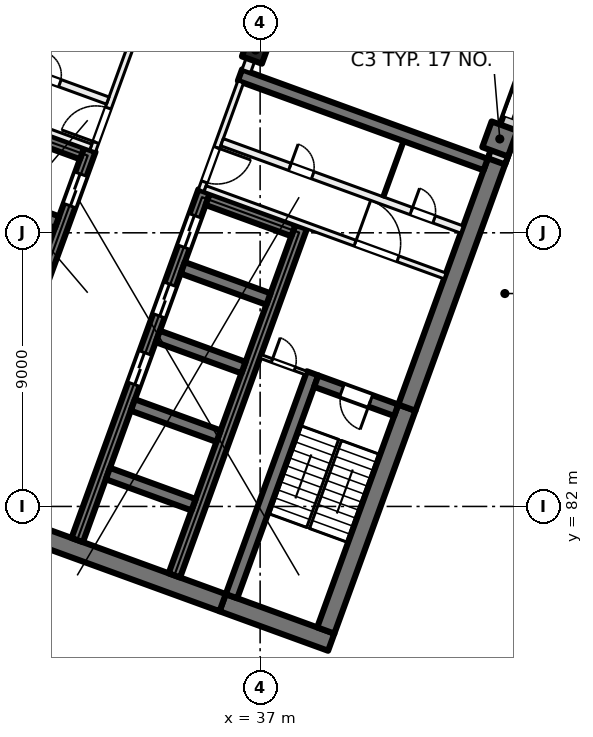
"""IFC4 building model, lengths in metres.
Left out: names, types, materials, properties, quantities, classifications, styles, units other than length and angle.
Written with IfcOpenShell. Run it as: python <this file> out.ifc"""

import sys

from ifc_helpers import new_model, si_unit, direction, frame, frame_2d, origin, origin_2d, place, context, subcontext, project, spatial, rectangle, extrude, element, fill, save


model = new_model("IFC4")
c1 = context("Model", 3, precision=1e-05, world=origin(), true_north=direction((0.0, 1.0)))
c2 = subcontext(c1, "Body", "Model", "MODEL_VIEW")
j1 = project(units=[si_unit("LENGTHUNIT", "METRE"), si_unit("PLANEANGLEUNIT", "RADIAN")], contexts=[c1])
p1 = place(None, origin())
s1 = spatial("IfcSite", under=j1, at=p1, CompositionType="ELEMENT")
p2 = place(p1, origin())
s2 = spatial("IfcBuilding", under=s1, at=p2, CompositionType="ELEMENT")
p3 = place(p2, frame((0.0, 0.0, 71.5)))
s3 = spatial("IfcBuildingStorey", under=s2, at=p3, CompositionType="ELEMENT", Elevation=71.5)
p4 = place(p3, frame((36.849, 97.011, 0.0), z_axis=(0.0, 0.0, 1.0), x_axis=(-0.342020143326, -0.939692620786, 0.0)))
e1 = element("IfcColumn", 1, at=p4, inside=s3, PredefinedType="COLUMN", context=c2, shape_type="SweptSolid", body=[
    extrude(rectangle(XDim=0.7, YDim=0.7, at=origin_2d()), origin(), (0.0, 0.0, 1.0), 4.0),
])
p5 = place(p3, frame((44.884, 94.087, 0.0), z_axis=(0.0, 0.0, 1.0), x_axis=(-0.342020143326, -0.939692620786, 0.0)))
e2 = element("IfcColumn", 2, at=p5, inside=s3, PredefinedType="COLUMN", context=c2, shape_type="SweptSolid", body=[
    extrude(rectangle(XDim=0.9, YDim=0.9, at=origin_2d()), origin(), (0.0, 0.0, 1.0), 4.0),
])
p6 = place(p3, frame((39.338, 77.535, 0.0), z_axis=(0.0, 0.0, 1.0), x_axis=(-0.939701471648, 0.341995824804, 0.0)))
e3 = element("IfcWall", 3, at=p6, inside=s3, PredefinedType="SHEAR", context=c2, shape_type="SweptSolid", body=[
    extrude(rectangle(XDim=3.8, YDim=0.6, at=frame_2d((1.9, 0.0))), origin(), (0.0, 0.0, 1.0), 4.0),
])
p7 = place(p3, frame((35.767, 78.835, 0.0), z_axis=(0.0, 0.0, 1.0), x_axis=(-0.939692894512, 0.342019391267, 0.0)))
e4 = element("IfcWall", 4, at=p7, inside=s3, PredefinedType="SHEAR", context=c2, shape_type="SweptSolid", body=[
    extrude(rectangle(XDim=14.4, YDim=0.6, at=frame_2d((7.2, 0.0))), origin(), (0.0, 0.0, 1.0), 4.0),
])
p8 = place(p3, frame((39.159, 77.92, 0.0), z_axis=(0.0, 0.0, 1.0), x_axis=(0.342016982193, 0.939693771338, 0.0)))
e5 = element("IfcWall", 5, at=p8, inside=s3, PredefinedType="SHEAR", context=c2, shape_type="SweptSolid", body=[
    extrude(rectangle(XDim=7.8, YDim=0.6, at=frame_2d((3.9, 0.0))), origin(), (0.0, 0.0, 1.0), 4.0),
])
p9 = place(p3, frame((41.827, 85.249, 0.0), z_axis=(0.0, 0.0, 1.0), x_axis=(0.342016162452, 0.939694069696, 0.0)))
e6 = element("IfcWall", 6, at=p9, inside=s3, PredefinedType="SHEAR", context=c2, shape_type="SweptSolid", body=[
    extrude(rectangle(XDim=8.9, YDim=0.6, at=frame_2d((4.45, 0.0))), origin(), (0.0, 0.0, 1.0), 4.0),
])
p10 = place(p3, frame((36.058, 79.048, 0.0), z_axis=(0.0, 0.0, 1.0), x_axis=(0.342016982193, 0.939693771338, 0.0)))
e7 = element("IfcWall", 7, at=p10, inside=s3, PredefinedType="SHEAR", context=c2, shape_type="SweptSolid", body=[
    extrude(rectangle(XDim=7.8, YDim=0.4, at=frame_2d((3.9, 0.0))), origin(), (0.0, 0.0, 1.0), 4.0),
])
p11 = place(p3, frame((41.476, 85.164, 0.0), z_axis=(0.0, 0.0, 1.0), x_axis=(-0.939678810556, 0.342058084236, 0.0)))
e8 = element("IfcWall", 8, at=p11, inside=s3, PredefinedType="SHEAR", context=c2, shape_type="SweptSolid", body=[
    extrude(rectangle(XDim=2.8, YDim=0.4, at=frame_2d((1.4, 0.0))), origin(), (0.0, 0.0, 1.0), 4.0),
])
p12 = place(p11, frame((0.9, 0.0, 0.0)))
e9 = element("IfcOpeningElement", 9, at=p12, cuts=e8, PredefinedType="OPENING", context=c2, shape_type="SweptSolid", body=[
    extrude(rectangle(XDim=1.0, YDim=2.1, at=frame_2d((0.5, 1.05))), frame((0.0, 0.21, 0.0), z_axis=(0.0, -1.0, 0.0), x_axis=(1.0, 0.0, 0.0)), (0.0, 0.0, 1.0), 0.42),
])
p13 = place(p3, frame((30.984, 80.895, 0.0), z_axis=(0.0, 0.0, 1.0), x_axis=(0.342021021735, 0.939692301071, 0.0)))
e10 = element("IfcWall", 10, at=p13, inside=s3, PredefinedType="SHEAR", context=c2, shape_type="SweptSolid", body=[
    extrude(rectangle(XDim=12.2, YDim=0.4, at=frame_2d((6.1, 0.0))), origin(), (0.0, 0.0, 1.0), 4.0),
])
p14 = place(p13, frame((5.45, 0.0, 0.0)))
e11 = element("IfcOpeningElement", 11, at=p14, cuts=e10, PredefinedType="OPENING", context=c2, shape_type="SweptSolid", body=[
    extrude(rectangle(XDim=1.1, YDim=2.1, at=frame_2d((0.55, 1.05))), frame((0.0, 0.21, 0.0), z_axis=(0.0, -1.0, 0.0), x_axis=(1.0, 0.0, 0.0)), (0.0, 0.0, 1.0), 0.42),
])
p15 = place(p13, frame((7.85, 0.0, 0.0)))
e12 = element("IfcOpeningElement", 12, at=p15, cuts=e10, PredefinedType="OPENING", context=c2, shape_type="SweptSolid", body=[
    extrude(rectangle(XDim=1.1, YDim=2.1, at=frame_2d((0.55, 1.05))), frame((0.0, 0.21, 0.0), z_axis=(0.0, -1.0, 0.0), x_axis=(1.0, 0.0, 0.0)), (0.0, 0.0, 1.0), 0.42),
])
p16 = place(p13, frame((10.25, 0.0, 0.0)))
e13 = element("IfcOpeningElement", 13, at=p16, cuts=e10, PredefinedType="OPENING", context=c2, shape_type="SweptSolid", body=[
    extrude(rectangle(XDim=1.1, YDim=2.1, at=frame_2d((0.55, 1.05))), frame((0.0, 0.21, 0.0), z_axis=(0.0, -1.0, 0.0), x_axis=(1.0, 0.0, 0.0)), (0.0, 0.0, 1.0), 0.42),
])
p17 = place(p3, frame((34.178, 79.732, 0.0), z_axis=(0.0, 0.0, 1.0), x_axis=(0.342014590177, 0.939694641948, 0.0)))
e14 = element("IfcWall", 14, at=p17, inside=s3, PredefinedType="SHEAR", context=c2, shape_type="SweptSolid", body=[
    extrude(rectangle(XDim=12.2, YDim=0.4, at=frame_2d((6.1, 0.0))), origin(), (0.0, 0.0, 1.0), 4.0),
])
for number, where, z_axis, x_axis in (
    (15, (34.812, 82.056, 0.0), (0.0, 0.0, 1.0), (-0.94, 0.342, 0.0)),
    (16, (35.632, 84.311, 0.0), (0.0, 0.0, 1.0), (-0.94, 0.342, 0.0)),
    (17, (36.453, 86.566, 0.0), (0.0, 0.0, 1.0), (-0.94, 0.342, 0.0)),
    (18, (37.274, 88.822, 0.0), (0.0, 0.0, 1.0), (-0.94, 0.342, 0.0)),
):
    element("IfcWall", number, at=place(p3, frame(where, z_axis=z_axis, x_axis=x_axis)), inside=s3, PredefinedType="SHEAR", context=c2, shape_type="SweptSolid", body=[
        extrude(rectangle(XDim=3.0, YDim=0.4, at=frame_2d((1.5, 0.0))), origin(), (0.0, 0.0, 1.0), 4.0),
    ])
p18 = place(p3, frame((38.095, 91.077, 0.0), z_axis=(0.0, 0.0, 1.0), x_axis=(-0.939676934218, 0.342063238742, 0.0)))
e19 = element("IfcWall", 19, at=p18, inside=s3, PredefinedType="SHEAR", context=c2, shape_type="SweptSolid", body=[
    extrude(rectangle(XDim=3.0, YDim=0.4, at=frame_2d((1.5, 0.0))), origin(), (0.0, 0.0, 1.0), 4.0),
])
p19 = place(p3, frame((27.225, 82.263, 0.0), z_axis=(0.0, 0.0, 1.0), x_axis=(0.342014590177, 0.939694641948, 0.0)))
e20 = element("IfcWall", 20, at=p19, inside=s3, PredefinedType="SHEAR", context=c2, shape_type="SweptSolid", body=[
    extrude(rectangle(XDim=12.2, YDim=0.4, at=frame_2d((6.1, 0.0))), origin(), (0.0, 0.0, 1.0), 4.0),
])
p20 = place(p19, frame((10.25, 0.0, 0.0)))
e21 = element("IfcOpeningElement", 21, at=p20, cuts=e20, PredefinedType="OPENING", context=c2, shape_type="SweptSolid", body=[
    extrude(rectangle(XDim=1.1, YDim=2.1, at=frame_2d((0.55, 1.05))), frame((0.0, 0.21, 0.0), z_axis=(0.0, -1.0, 0.0), x_axis=(1.0, 0.0, 0.0)), (0.0, 0.0, 1.0), 0.42),
])
p21 = place(p19, frame((0.7, 0.0, 0.0)))
e22 = element("IfcOpeningElement", 22, at=p21, cuts=e20, PredefinedType="OPENING", context=c2, shape_type="SweptSolid", body=[
    extrude(rectangle(XDim=0.8, YDim=2.1, at=frame_2d((0.4, 1.05))), frame((0.0, 0.21, 0.0), z_axis=(0.0, -1.0, 0.0), x_axis=(1.0, 0.0, 0.0)), (0.0, 0.0, 1.0), 0.42),
])
for number, where, z_axis, x_axis in (
    (23, (30.32, 91.353, 0.0), (0.0, 0.0, 1.0), (-0.94, 0.342, 0.0)),
    (24, (31.141, 93.608, 0.0), (0.0, 0.0, 1.0), (-0.94, 0.342, 0.0)),
):
    element("IfcWall", number, at=place(p3, frame(where, z_axis=z_axis, x_axis=x_axis)), inside=s3, PredefinedType="SHEAR", context=c2, shape_type="SweptSolid", body=[
        extrude(rectangle(XDim=3.0, YDim=0.4, at=frame_2d((1.5, 0.0))), origin(), (0.0, 0.0, 1.0), 4.0),
    ])
p22 = place(p3, frame((44.418, 93.245, 0.0), z_axis=(0.0, 0.0, 1.0), x_axis=(-0.93969060187, 0.342025690201, 0.0)))
e25 = element("IfcWall", 25, at=p22, inside=s3, PredefinedType="SHEAR", context=c2, shape_type="SweptSolid", body=[
    extrude(rectangle(XDim=8.6, YDim=0.4, at=frame_2d((4.3, 0.0))), origin(), (0.0, 0.0, 1.0), 4.0),
])
p23 = place(p3, frame((52.212, 113.783, 0.0), z_axis=(0.0, 0.0, 1.0), x_axis=(-0.34202521188, -0.939690775968, 0.0)))
e26 = element("IfcWall", 26, at=p23, inside=s3, PredefinedType="SOLIDWALL", context=c2, shape_type="SweptSolid", body=[
    extrude(rectangle(XDim=21.745, YDim=0.6, at=frame_2d((10.873, 0.0))), origin(), (0.0, 0.0, 1.0), 3.625),
])
p24 = place(p23, frame((3.765, 0.0, 0.9)))
e27 = element("IfcOpeningElement", 27, at=p24, cuts=e26, PredefinedType="OPENING", context=c2, shape_type="SweptSolid", body=[
    extrude(rectangle(XDim=3.0, YDim=2.4, at=frame_2d((1.5, 1.2))), frame((0.0, 0.31, 0.0), z_axis=(0.0, -1.0, 0.0), x_axis=(1.0, 0.0, 0.0)), (0.0, 0.0, 1.0), 0.62),
])
p25 = place(p23, frame((8.265, 0.0, 0.9)))
e28 = element("IfcOpeningElement", 28, at=p25, cuts=e26, PredefinedType="OPENING", context=c2, shape_type="SweptSolid", body=[
    extrude(rectangle(XDim=3.0, YDim=2.4, at=frame_2d((1.5, 1.2))), frame((0.0, 0.31, 0.0), z_axis=(0.0, -1.0, 0.0), x_axis=(1.0, 0.0, 0.0)), (0.0, 0.0, 1.0), 0.62),
])
p26 = place(p23, frame((12.765, 0.0, 0.9)))
e29 = element("IfcOpeningElement", 29, at=p26, cuts=e26, PredefinedType="OPENING", context=c2, shape_type="SweptSolid", body=[
    extrude(rectangle(XDim=3.0, YDim=2.4, at=frame_2d((1.5, 1.2))), frame((0.0, 0.31, 0.0), z_axis=(0.0, -1.0, 0.0), x_axis=(1.0, 0.0, 0.0)), (0.0, 0.0, 1.0), 0.62),
])
p27 = place(p23, frame((17.265, 0.0, 0.9)))
e30 = element("IfcOpeningElement", 30, at=p27, cuts=e26, PredefinedType="OPENING", context=c2, shape_type="SweptSolid", body=[
    extrude(rectangle(XDim=3.0, YDim=2.4, at=frame_2d((1.5, 1.2))), frame((0.0, 0.31, 0.0), z_axis=(0.0, -1.0, 0.0), x_axis=(1.0, 0.0, 0.0)), (0.0, 0.0, 1.0), 0.62),
])
p28 = place(p3, frame((31.491, 93.693, 0.0), z_axis=(0.0, 0.0, 1.0), x_axis=(0.341995824804, 0.939701471648, 0.0)))
e31 = element("IfcWall", 31, at=p28, inside=s3, PredefinedType="PARTITIONING", context=c2, shape_type="SweptSolid", body=[
    extrude(rectangle(XDim=3.8, YDim=0.2, at=frame_2d((1.9, 0.0))), origin(), (0.0, 0.0, 1.0), 3.625),
])
p29 = place(p28, frame((0.3, 0.0, 0.0)))
e32 = element("IfcOpeningElement", 32, at=p29, cuts=e31, PredefinedType="OPENING", context=c2, shape_type="SweptSolid", body=[
    extrude(rectangle(XDim=1.2, YDim=2.1, at=frame_2d((0.6, 1.05))), frame((0.0, 0.11, 0.0), z_axis=(0.0, -1.0, 0.0), x_axis=(1.0, 0.0, 0.0)), (0.0, 0.0, 1.0), 0.22),
])
p30 = place(p3, frame((23.538, 96.694, 0.0), z_axis=(0.0, 0.0, 1.0), x_axis=(0.939691552312, -0.342023078919, 0.0)))
e33 = element("IfcWall", 33, at=p30, inside=s3, PredefinedType="PARTITIONING", context=c2, shape_type="SweptSolid", body=[
    extrude(rectangle(XDim=8.4, YDim=0.2, at=frame_2d((4.2, 0.0))), origin(), (0.0, 0.0, 1.0), 3.625),
])
p31 = place(p30, frame((1.65, 0.0, 0.0)))
e34 = element("IfcOpeningElement", 34, at=p31, cuts=e33, PredefinedType="OPENING", context=c2, shape_type="SweptSolid", body=[
    extrude(rectangle(XDim=1.5, YDim=2.1, at=frame_2d((0.75, 1.05))), frame((0.0, 0.11, 0.0), z_axis=(0.0, -1.0, 0.0), x_axis=(1.0, 0.0, 0.0)), (0.0, 0.0, 1.0), 0.22),
])
p32 = place(p3, frame((24.094, 98.221, 0.0), z_axis=(0.0, 0.0, 1.0), x_axis=(0.939691552312, -0.342023078919, 0.0)))
e35 = element("IfcWall", 35, at=p32, inside=s3, PredefinedType="PARTITIONING", context=c2, shape_type="SweptSolid", body=[
    extrude(rectangle(XDim=8.4, YDim=0.25, at=frame_2d((4.2, 0.0))), origin(), (0.0, 0.0, 1.0), 3.625),
])
p33 = place(p32, frame((5.925, 0.0, 0.0)))
e36 = element("IfcOpeningElement", 36, at=p33, cuts=e35, PredefinedType="OPENING", context=c2, shape_type="SweptSolid", body=[
    extrude(rectangle(XDim=0.8, YDim=2.1, at=frame_2d((0.4, 1.05))), frame((0.0, 0.135, 0.0), z_axis=(0.0, -1.0, 0.0), x_axis=(1.0, 0.0, 0.0)), (0.0, 0.0, 1.0), 0.27),
])
p34 = place(p32, frame((1.575, 0.0, 0.0)))
e37 = element("IfcOpeningElement", 37, at=p34, cuts=e35, PredefinedType="OPENING", context=c2, shape_type="SweptSolid", body=[
    extrude(rectangle(XDim=1.0, YDim=2.1, at=frame_2d((0.5, 1.05))), frame((0.0, 0.135, 0.0), z_axis=(0.0, -1.0, 0.0), x_axis=(1.0, 0.0, 0.0)), (0.0, 0.0, 1.0), 0.27),
])
p35 = place(p3, frame((36.362, 95.964, 0.0), z_axis=(0.0, 0.0, 1.0), x_axis=(-0.341995824804, -0.939701471648, 0.0)))
e38 = element("IfcWall", 38, at=p35, inside=s3, PredefinedType="PARTITIONING", context=c2, shape_type="SweptSolid", body=[
    extrude(rectangle(XDim=3.8, YDim=0.2, at=frame_2d((1.9, 0.0))), origin(), (0.0, 0.0, 1.0), 3.625),
])
p36 = place(p35, frame((2.3, 0.0, 0.0)))
e39 = element("IfcOpeningElement", 39, at=p36, cuts=e38, PredefinedType="OPENING", context=c2, shape_type="SweptSolid", body=[
    extrude(rectangle(XDim=1.2, YDim=2.1, at=frame_2d((0.6, 1.05))), frame((0.0, 0.11, 0.0), z_axis=(0.0, -1.0, 0.0), x_axis=(1.0, 0.0, 0.0)), (0.0, 0.0, 1.0), 0.22),
])
p37 = place(p3, frame((35.19, 92.453, 0.0), z_axis=(0.0, 0.0, 1.0), x_axis=(0.939691552312, -0.342023078919, 0.0)))
e40 = element("IfcWall", 40, at=p37, inside=s3, PredefinedType="PARTITIONING", context=c2, shape_type="SweptSolid", body=[
    extrude(rectangle(XDim=8.4, YDim=0.2, at=frame_2d((4.2, 0.0))), origin(), (0.0, 0.0, 1.0), 3.625),
])
p38 = place(p37, frame((5.25, 0.0, 0.0)))
e41 = element("IfcOpeningElement", 41, at=p38, cuts=e40, PredefinedType="OPENING", context=c2, shape_type="SweptSolid", body=[
    extrude(rectangle(XDim=1.5, YDim=2.1, at=frame_2d((0.75, 1.05))), frame((0.0, 0.11, 0.0), z_axis=(0.0, -1.0, 0.0), x_axis=(1.0, 0.0, 0.0)), (0.0, 0.0, 1.0), 0.22),
])
p39 = place(p3, frame((35.746, 93.98, 0.0), z_axis=(0.0, 0.0, 1.0), x_axis=(0.939691552312, -0.342023078919, 0.0)))
e42 = element("IfcWall", 42, at=p39, inside=s3, PredefinedType="PARTITIONING", context=c2, shape_type="SweptSolid", body=[
    extrude(rectangle(XDim=8.4, YDim=0.25, at=frame_2d((4.2, 0.0))), origin(), (0.0, 0.0, 1.0), 3.625),
])
p40 = place(p39, frame((2.375, 0.0, 0.0)))
e43 = element("IfcOpeningElement", 43, at=p40, cuts=e42, PredefinedType="OPENING", context=c2, shape_type="SweptSolid", body=[
    extrude(rectangle(XDim=0.8, YDim=2.1, at=frame_2d((0.4, 1.05))), frame((0.0, 0.135, 0.0), z_axis=(0.0, -1.0, 0.0), x_axis=(1.0, 0.0, 0.0)), (0.0, 0.0, 1.0), 0.27),
])
p41 = place(p39, frame((6.625, 0.0, 0.0)))
e44 = element("IfcOpeningElement", 44, at=p41, cuts=e42, PredefinedType="OPENING", context=c2, shape_type="SweptSolid", body=[
    extrude(rectangle(XDim=0.8, YDim=2.1, at=frame_2d((0.4, 1.05))), frame((0.0, 0.135, 0.0), z_axis=(0.0, -1.0, 0.0), x_axis=(1.0, 0.0, 0.0)), (0.0, 0.0, 1.0), 0.27),
])
p42 = place(p3, frame((37.013, 86.935, 0.0), z_axis=(0.0, 0.0, 1.0), x_axis=(0.939659694648, -0.342110593602, 0.0)))
e45 = element("IfcWall", 45, at=p42, inside=s3, PredefinedType="PARTITIONING", context=c2, shape_type="SweptSolid", body=[
    extrude(rectangle(XDim=1.6, YDim=0.125, at=frame_2d((0.8, 0.0))), origin(), (0.0, 0.0, 1.0), 3.625),
])
p43 = place(p42, frame((0.4, 0.0, 0.0)))
e46 = element("IfcOpeningElement", 46, at=p43, cuts=e45, PredefinedType="OPENING", context=c2, shape_type="SweptSolid", body=[
    extrude(rectangle(XDim=0.8, YDim=2.1, at=frame_2d((0.4, 1.05))), frame((0.0, 0.073, 0.0), z_axis=(0.0, -1.0, 0.0), x_axis=(1.0, 0.0, 0.0)), (0.0, 0.0, 1.0), 0.145),
])
p44 = place(p3, frame((41.718, 94.015, 0.0), z_axis=(0.0, 0.0, 1.0), x_axis=(-0.342064742067, -0.939676386973, 0.0)))
e47 = element("IfcWall", 47, at=p44, inside=s3, PredefinedType="PARTITIONING", context=c2, shape_type="SweptSolid", body=[
    extrude(rectangle(XDim=1.95, YDim=0.1, at=frame_2d((0.975, 0.0))), origin(), (0.0, 0.0, 1.0), 3.625),
])
p45 = place(p3, frame((47.314, 125.909, 0.0), z_axis=(0.0, 0.0, 1.0), x_axis=(-0.342010770371, -0.939696032209, 0.0)))
e48 = element("IfcWall", 48, at=p45, inside=s3, PredefinedType="PARTITIONING", context=c2, shape_type="SweptSolid", body=[
    extrude(rectangle(XDim=31.485, YDim=0.3, at=frame_2d((15.742, 0.0))), origin(), (0.0, 0.0, 1.0), 3.625),
])
p46 = place(p45, frame((16.709, 0.0, 0.0)))
e49 = element("IfcOpeningElement", 49, at=p46, cuts=e48, PredefinedType="OPENING", context=c2, shape_type="SweptSolid", body=[
    extrude(rectangle(XDim=1.8, YDim=2.1, at=frame_2d((0.9, 1.05))), frame((0.0, 0.16, 0.0), z_axis=(0.0, -1.0, 0.0), x_axis=(1.0, 0.0, 0.0)), (0.0, 0.0, 1.0), 0.32),
])
p47 = place(p27, origin())
e50 = element("IfcWindow", 50, at=p47, inside=s3, PartitioningType="SINGLE_PANEL", PredefinedType="WINDOW", context=c2, shape_type="SweptSolid", body=[
    extrude(rectangle(XDim=3.0, YDim=2.4, at=frame_2d((1.5, 1.2))), frame((0.0, 0.03, 0.0), z_axis=(0.0, -1.0, 0.0), x_axis=(1.0, 0.0, 0.0)), (0.0, 0.0, 1.0), 0.06),
])
fill(e30, e50)
p48 = place(p20, origin())
e51 = element("IfcDoor", 51, at=p48, inside=s3, OperationType="DOUBLE_DOOR_SLIDING", PredefinedType="DOOR", context=c2, shape_type="SweptSolid", body=[
    extrude(rectangle(XDim=1.1, YDim=2.1, at=frame_2d((0.55, 1.05))), frame((0.0, 0.025, 0.0), z_axis=(0.0, -1.0, 0.0), x_axis=(1.0, 0.0, 0.0)), (0.0, 0.0, 1.0), 0.05),
])
fill(e21, e51)
p49 = place(p14, origin())
e52 = element("IfcDoor", 52, at=p49, inside=s3, OperationType="DOUBLE_DOOR_SLIDING", PredefinedType="DOOR", context=c2, shape_type="SweptSolid", body=[
    extrude(rectangle(XDim=1.1, YDim=2.1, at=frame_2d((0.55, 1.05))), frame((0.0, 0.025, 0.0), z_axis=(0.0, -1.0, 0.0), x_axis=(1.0, 0.0, 0.0)), (0.0, 0.0, 1.0), 0.05),
])
fill(e11, e52)
p50 = place(p15, origin())
e53 = element("IfcDoor", 53, at=p50, inside=s3, OperationType="DOUBLE_DOOR_SLIDING", PredefinedType="DOOR", context=c2, shape_type="SweptSolid", body=[
    extrude(rectangle(XDim=1.1, YDim=2.1, at=frame_2d((0.55, 1.05))), frame((0.0, 0.025, 0.0), z_axis=(0.0, -1.0, 0.0), x_axis=(1.0, 0.0, 0.0)), (0.0, 0.0, 1.0), 0.05),
])
fill(e12, e53)
p51 = place(p16, origin())
e54 = element("IfcDoor", 54, at=p51, inside=s3, OperationType="DOUBLE_DOOR_SLIDING", PredefinedType="DOOR", context=c2, shape_type="SweptSolid", body=[
    extrude(rectangle(XDim=1.1, YDim=2.1, at=frame_2d((0.55, 1.05))), frame((0.0, 0.025, 0.0), z_axis=(0.0, -1.0, 0.0), x_axis=(1.0, 0.0, 0.0)), (0.0, 0.0, 1.0), 0.05),
])
fill(e13, e54)
p52 = place(p29, origin())
e55 = element("IfcDoor", 55, at=p52, inside=s3, OperationType="DOUBLE_DOOR_SINGLE_SWING", PredefinedType="DOOR", context=c2, shape_type="SweptSolid", body=[
    extrude(rectangle(XDim=1.2, YDim=2.1, at=frame_2d((0.6, 1.05))), frame((0.0, 0.025, 0.0), z_axis=(0.0, -1.0, 0.0), x_axis=(1.0, 0.0, 0.0)), (0.0, 0.0, 1.0), 0.05),
])
fill(e32, e55)
p53 = place(p33, origin())
e56 = element("IfcDoor", 56, at=p53, inside=s3, OperationType="SINGLE_SWING_LEFT", PredefinedType="DOOR", context=c2, shape_type="SweptSolid", body=[
    extrude(rectangle(XDim=0.8, YDim=2.1, at=frame_2d((0.4, 1.05))), frame((0.0, 0.025, 0.0), z_axis=(0.0, -1.0, 0.0), x_axis=(1.0, 0.0, 0.0)), (0.0, 0.0, 1.0), 0.05),
])
fill(e36, e56)
p54 = place(p36, origin())
e57 = element("IfcDoor", 57, at=p54, inside=s3, OperationType="DOUBLE_DOOR_SINGLE_SWING", PredefinedType="DOOR", context=c2, shape_type="SweptSolid", body=[
    extrude(rectangle(XDim=1.2, YDim=2.1, at=frame_2d((0.6, 1.05))), frame((0.0, 0.025, 0.0), z_axis=(0.0, -1.0, 0.0), x_axis=(1.0, 0.0, 0.0)), (0.0, 0.0, 1.0), 0.05),
])
fill(e39, e57)
p55 = place(p38, origin())
e58 = element("IfcDoor", 58, at=p55, inside=s3, OperationType="DOUBLE_DOOR_SINGLE_SWING", PredefinedType="DOOR", context=c2, shape_type="SweptSolid", body=[
    extrude(rectangle(XDim=1.5, YDim=2.1, at=frame_2d((0.75, 1.05))), frame((0.0, 0.025, 0.0), z_axis=(0.0, -1.0, 0.0), x_axis=(1.0, 0.0, 0.0)), (0.0, 0.0, 1.0), 0.05),
])
fill(e41, e58)
p56 = place(p12, origin())
e59 = element("IfcDoor", 59, at=p56, inside=s3, OperationType="SINGLE_SWING_RIGHT", PredefinedType="DOOR", context=c2, shape_type="SweptSolid", body=[
    extrude(rectangle(XDim=1.0, YDim=2.1, at=frame_2d((0.5, 1.05))), frame((0.0, 0.025, 0.0), z_axis=(0.0, -1.0, 0.0), x_axis=(1.0, 0.0, 0.0)), (0.0, 0.0, 1.0), 0.05),
])
fill(e9, e59)
p57 = place(p43, origin())
e60 = element("IfcDoor", 60, at=p57, inside=s3, OperationType="SINGLE_SWING_LEFT", PredefinedType="DOOR", context=c2, shape_type="SweptSolid", body=[
    extrude(rectangle(XDim=0.8, YDim=2.1, at=frame_2d((0.4, 1.05))), frame((0.0, 0.025, 0.0), z_axis=(0.0, -1.0, 0.0), x_axis=(1.0, 0.0, 0.0)), (0.0, 0.0, 1.0), 0.05),
])
fill(e46, e60)
p58 = place(p40, origin())
e61 = element("IfcDoor", 61, at=p58, inside=s3, OperationType="SINGLE_SWING_RIGHT", PredefinedType="DOOR", context=c2, shape_type="SweptSolid", body=[
    extrude(rectangle(XDim=0.8, YDim=2.1, at=frame_2d((0.4, 1.05))), frame((0.0, 0.025, 0.0), z_axis=(0.0, -1.0, 0.0), x_axis=(1.0, 0.0, 0.0)), (0.0, 0.0, 1.0), 0.05),
])
fill(e43, e61)
p59 = place(p41, origin())
e62 = element("IfcDoor", 62, at=p59, inside=s3, OperationType="SINGLE_SWING_LEFT", PredefinedType="DOOR", context=c2, shape_type="SweptSolid", body=[
    extrude(rectangle(XDim=0.8, YDim=2.1, at=frame_2d((0.4, 1.05))), frame((0.0, 0.025, 0.0), z_axis=(0.0, -1.0, 0.0), x_axis=(1.0, 0.0, 0.0)), (0.0, 0.0, 1.0), 0.05),
])
fill(e44, e62)
save(model, sys.argv[1])
